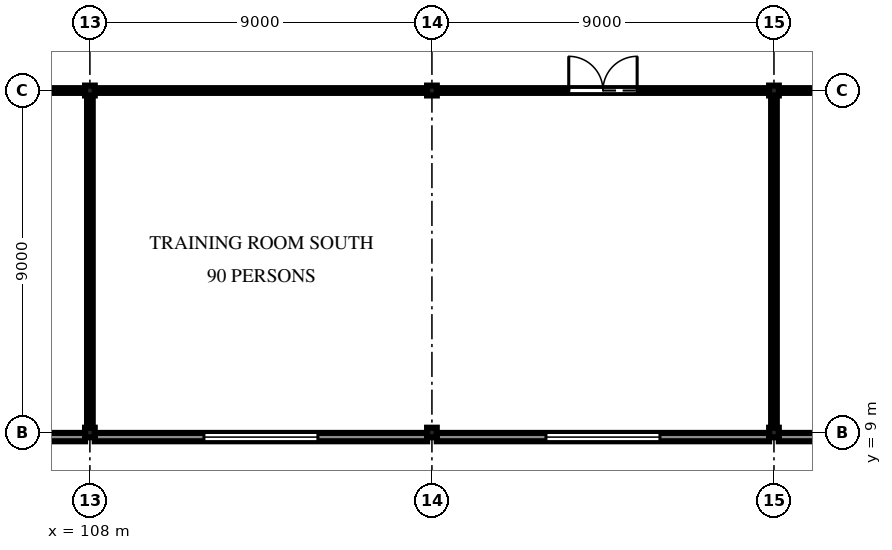
"""IFC4 building model, lengths in metres.
Left out: names, types, materials, properties, quantities, classifications, styles, units other than length and angle.
Written with IfcOpenShell. Run it as: python <this file> out.ifc"""

import sys

from ifc_helpers import new_model, si_unit, direction, frame, frame_2d, origin, origin_2d, place, context, subcontext, project, spatial, polyline, rectangle, i_section, outline, extrude, element, fill, save


model = new_model("IFC4")
c1 = context("Model", 3, precision=1e-05, world=origin(), true_north=direction((0.0, 1.0)))
c2 = subcontext(c1, "Body", "Model", "MODEL_VIEW")
j1 = project(units=[si_unit("LENGTHUNIT", "METRE"), si_unit("PLANEANGLEUNIT", "RADIAN")], contexts=[c1])
p1 = place(None, origin())
s1 = spatial("IfcSite", under=j1, at=p1, CompositionType="ELEMENT")
p2 = place(p1, origin())
s2 = spatial("IfcBuilding", under=s1, at=p2, CompositionType="ELEMENT")
p3 = place(p2, frame((0.0, 0.0, 7.5)))
s3 = spatial("IfcBuildingStorey", under=s2, at=p3, CompositionType="ELEMENT", Elevation=7.5)
p4 = place(p3, frame((108.0, 9.0, 0.0), z_axis=(0.0, 0.0, 1.0), x_axis=(1.0, 0.0, 0.0)))
e1 = element("IfcColumn", 1, at=p4, inside=s3, PredefinedType="COLUMN", context=c2, shape_type="SweptSolid", body=[
    extrude(i_section(OverallWidth=0.255, OverallDepth=0.254, WebThickness=0.009, FlangeThickness=0.014, FilletRadius=0.013, at=origin_2d()), origin(), (0.0, 0.0, 1.0), 4.2),
])
p5 = place(p3, frame((108.0, 18.0, 0.0), z_axis=(0.0, 0.0, 1.0), x_axis=(1.0, 0.0, 0.0)))
e2 = element("IfcColumn", 2, at=p5, inside=s3, PredefinedType="COLUMN", context=c2, shape_type="SweptSolid", body=[
    extrude(i_section(OverallWidth=0.256, OverallDepth=0.26, WebThickness=0.01, FlangeThickness=0.017, FilletRadius=0.013, at=origin_2d()), origin(), (0.0, 0.0, 1.0), 4.2),
])
p6 = place(p3, frame((117.0, 9.0, 0.0), z_axis=(0.0, 0.0, 1.0), x_axis=(1.0, 0.0, 0.0)))
e3 = element("IfcColumn", 3, at=p6, inside=s3, PredefinedType="COLUMN", context=c2, shape_type="SweptSolid", body=[
    extrude(i_section(OverallWidth=0.255, OverallDepth=0.254, WebThickness=0.009, FlangeThickness=0.014, FilletRadius=0.013, at=origin_2d()), origin(), (0.0, 0.0, 1.0), 4.2),
])
p7 = place(p3, frame((117.0, 18.0, 0.0), z_axis=(0.0, 0.0, 1.0), x_axis=(1.0, 0.0, 0.0)))
e4 = element("IfcColumn", 4, at=p7, inside=s3, PredefinedType="COLUMN", context=c2, shape_type="SweptSolid", body=[
    extrude(i_section(OverallWidth=0.256, OverallDepth=0.26, WebThickness=0.01, FlangeThickness=0.017, FilletRadius=0.013, at=origin_2d()), origin(), (0.0, 0.0, 1.0), 4.2),
])
p8 = place(p3, frame((126.0, 9.0, 0.0), z_axis=(0.0, 0.0, 1.0), x_axis=(1.0, 0.0, 0.0)))
e5 = element("IfcColumn", 5, at=p8, inside=s3, PredefinedType="COLUMN", context=c2, shape_type="SweptSolid", body=[
    extrude(i_section(OverallWidth=0.255, OverallDepth=0.254, WebThickness=0.009, FlangeThickness=0.014, FilletRadius=0.013, at=origin_2d()), origin(), (0.0, 0.0, 1.0), 4.2),
])
p9 = place(p3, frame((126.0, 18.0, 0.0), z_axis=(0.0, 0.0, 1.0), x_axis=(1.0, 0.0, 0.0)))
e6 = element("IfcColumn", 6, at=p9, inside=s3, PredefinedType="COLUMN", context=c2, shape_type="SweptSolid", body=[
    extrude(i_section(OverallWidth=0.256, OverallDepth=0.26, WebThickness=0.01, FlangeThickness=0.017, FilletRadius=0.013, at=origin_2d()), origin(), (0.0, 0.0, 1.0), 4.2),
])
p10 = place(p3, frame((99.127, 8.88, -0.13), z_axis=(0.0, 0.0, 1.0), x_axis=(1.0, 0.0, 0.0)))
e7 = element("IfcWall", 7, at=p10, inside=s3, PredefinedType="SOLIDWALL", context=c2, shape_type="SweptSolid", body=[
    extrude(rectangle(XDim=8.746, YDim=0.22, at=frame_2d((4.373, 0.0))), origin(), (0.0, 0.0, 1.0), 3.727),
])
p11 = place(p10, frame((2.873, 0.0, 1.03)))
e8 = element("IfcOpeningElement", 8, at=p11, cuts=e7, PredefinedType="OPENING", context=c2, shape_type="SweptSolid", body=[
    extrude(rectangle(XDim=3.0, YDim=2.1, at=frame_2d((1.5, 1.05))), frame((0.0, 0.12, 0.0), z_axis=(0.0, -1.0, 0.0), x_axis=(1.0, 0.0, 0.0)), (0.0, 0.0, 1.0), 0.24),
])
p12 = place(p3, frame((108.127, 8.88, -0.13), z_axis=(0.0, 0.0, 1.0), x_axis=(1.0, 0.0, 0.0)))
e9 = element("IfcWall", 9, at=p12, inside=s3, PredefinedType="SOLIDWALL", context=c2, shape_type="SweptSolid", body=[
    extrude(rectangle(XDim=8.746, YDim=0.22, at=frame_2d((4.373, 0.0))), origin(), (0.0, 0.0, 1.0), 3.727),
])
p13 = place(p12, frame((2.873, 0.0, 1.03)))
e10 = element("IfcOpeningElement", 10, at=p13, cuts=e9, PredefinedType="OPENING", context=c2, shape_type="SweptSolid", body=[
    extrude(rectangle(XDim=3.0, YDim=2.1, at=frame_2d((1.5, 1.05))), frame((0.0, 0.12, 0.0), z_axis=(0.0, -1.0, 0.0), x_axis=(1.0, 0.0, 0.0)), (0.0, 0.0, 1.0), 0.24),
])
p14 = place(p3, frame((117.127, 8.88, -0.13), z_axis=(0.0, 0.0, 1.0), x_axis=(1.0, 0.0, 0.0)))
e11 = element("IfcWall", 11, at=p14, inside=s3, PredefinedType="SOLIDWALL", context=c2, shape_type="SweptSolid", body=[
    extrude(rectangle(XDim=8.746, YDim=0.22, at=frame_2d((4.373, 0.0))), origin(), (0.0, 0.0, 1.0), 3.727),
])
p15 = place(p14, frame((2.873, 0.0, 1.03)))
e12 = element("IfcOpeningElement", 12, at=p15, cuts=e11, PredefinedType="OPENING", context=c2, shape_type="SweptSolid", body=[
    extrude(rectangle(XDim=3.0, YDim=2.1, at=frame_2d((1.5, 1.05))), frame((0.0, 0.12, 0.0), z_axis=(0.0, -1.0, 0.0), x_axis=(1.0, 0.0, 0.0)), (0.0, 0.0, 1.0), 0.24),
])
p16 = place(p3, frame((126.127, 8.88, -0.13), z_axis=(0.0, 0.0, 1.0), x_axis=(1.0, 0.0, 0.0)))
e13 = element("IfcWall", 13, at=p16, inside=s3, PredefinedType="SOLIDWALL", context=c2, shape_type="SweptSolid", body=[
    extrude(rectangle(XDim=8.746, YDim=0.22, at=frame_2d((4.373, 0.0))), origin(), (0.0, 0.0, 1.0), 3.727),
])
p17 = place(p16, frame((2.873, 0.0, 1.03)))
e14 = element("IfcOpeningElement", 14, at=p17, cuts=e13, PredefinedType="OPENING", context=c2, shape_type="SweptSolid", body=[
    extrude(rectangle(XDim=3.0, YDim=2.1, at=frame_2d((1.5, 1.05))), frame((0.0, 0.12, 0.0), z_axis=(0.0, -1.0, 0.0), x_axis=(1.0, 0.0, 0.0)), (0.0, 0.0, 1.0), 0.24),
])
p18 = place(p3, frame((107.872, 18.0, 0.0), z_axis=(0.0, 0.0, 1.0), x_axis=(-1.0, 0.0, 0.0)))
e15 = element("IfcWall", 15, at=p18, inside=s3, PredefinedType="PARTITIONING", context=c2, shape_type="SweptSolid", body=[
    extrude(rectangle(XDim=8.744, YDim=0.125, at=frame_2d((4.372, 0.0))), origin(), (0.0, 0.0, 1.0), 3.307),
])
p19 = place(p18, frame((3.472, 0.0, 0.0)))
e16 = element("IfcOpeningElement", 16, at=p19, cuts=e15, PredefinedType="OPENING", context=c2, shape_type="SweptSolid", body=[
    extrude(rectangle(XDim=1.8, YDim=2.4, at=frame_2d((0.9, 1.2))), frame((0.0, 0.073, 0.0), z_axis=(0.0, -1.0, 0.0), x_axis=(1.0, 0.0, 0.0)), (0.0, 0.0, 1.0), 0.145),
])
p20 = place(p3, frame((134.872, 18.0, 0.0), z_axis=(0.0, 0.0, 1.0), x_axis=(-1.0, 0.0, 0.0)))
e17 = element("IfcWall", 17, at=p20, inside=s3, PredefinedType="PARTITIONING", context=c2, shape_type="SweptSolid", body=[
    extrude(rectangle(XDim=8.744, YDim=0.125, at=frame_2d((4.372, 0.0))), origin(), (0.0, 0.0, 1.0), 3.307),
])
p21 = place(p20, frame((3.472, 0.0, 0.0)))
e18 = element("IfcOpeningElement", 18, at=p21, cuts=e17, PredefinedType="OPENING", context=c2, shape_type="SweptSolid", body=[
    extrude(rectangle(XDim=1.8, YDim=2.1, at=frame_2d((0.9, 1.05))), frame((0.0, 0.073, 0.0), z_axis=(0.0, -1.0, 0.0), x_axis=(1.0, 0.0, 0.0)), (0.0, 0.0, 1.0), 0.145),
])
p22 = place(p3, frame((125.872, 18.0, 0.0), z_axis=(0.0, 0.0, 1.0), x_axis=(-1.0, 0.0, 0.0)))
e19 = element("IfcWall", 19, at=p22, inside=s3, PredefinedType="PARTITIONING", context=c2, shape_type="SweptSolid", body=[
    extrude(rectangle(XDim=8.744, YDim=0.125, at=frame_2d((4.372, 0.0))), origin(), (0.0, 0.0, 1.0), 3.307),
])
p23 = place(p22, frame((3.472, 0.0, 0.0)))
e20 = element("IfcOpeningElement", 20, at=p23, cuts=e19, PredefinedType="OPENING", context=c2, shape_type="SweptSolid", body=[
    extrude(rectangle(XDim=1.8, YDim=2.4, at=frame_2d((0.9, 1.2))), frame((0.0, 0.073, 0.0), z_axis=(0.0, -1.0, 0.0), x_axis=(1.0, 0.0, 0.0)), (0.0, 0.0, 1.0), 0.145),
])
p24 = place(p3, frame((116.872, 18.0, 0.0), z_axis=(0.0, 0.0, 1.0), x_axis=(-1.0, 0.0, 0.0)))
e21 = element("IfcWall", 21, at=p24, inside=s3, PredefinedType="PARTITIONING", context=c2, shape_type="SweptSolid", body=[
    extrude(rectangle(XDim=8.744, YDim=0.125, at=frame_2d((4.372, 0.0))), origin(), (0.0, 0.0, 1.0), 3.307),
])
for number, where, z_axis, x_axis in (
    (22, (108.0, 17.87, 0.0), (0.0, 0.0, 1.0), (0.0, -1.0, 0.0)),
    (23, (126.0, 17.87, 0.0), (0.0, 0.0, 1.0), (0.0, -1.0, 0.0)),
):
    element("IfcWall", number, at=place(p3, frame(where, z_axis=z_axis, x_axis=x_axis)), inside=s3, PredefinedType="PARTITIONING", context=c2, shape_type="SweptSolid", body=[
        extrude(rectangle(XDim=8.743, YDim=0.15, at=frame_2d((4.372, 0.0))), origin(), (0.0, 0.0, 1.0), 3.307),
    ])
p25 = place(p13, origin())
e24 = element("IfcWindow", 24, at=p25, inside=s3, PartitioningType="TRIPLE_PANEL_VERTICAL", PredefinedType="WINDOW", context=c2, shape_type="SweptSolid", body=[
    extrude(outline(polyline([(0.0, 0.0), (3.0, 0.0), (3.0, 2.1), (0.0, 2.1), (0.0, 0.0)]), holes=[polyline([(0.07, 0.07), (2.93, 0.07), (2.93, 2.03), (0.07, 2.03), (0.07, 0.07)])]), frame((0.0, 0.03, 0.0), z_axis=(0.0, -1.0, 0.0), x_axis=(1.0, 0.0, 0.0)), (0.0, 0.0, 1.0), 0.06),
    extrude(rectangle(XDim=0.04, YDim=1.96, at=frame_2d((1.017, 1.05))), frame((0.0, 0.022, 0.0), z_axis=(0.0, -1.0, 0.0), x_axis=(1.0, 0.0, 0.0)), (0.0, 0.0, 1.0), 0.044),
    extrude(rectangle(XDim=0.04, YDim=1.96, at=frame_2d((1.983, 1.05))), frame((0.0, 0.022, 0.0), z_axis=(0.0, -1.0, 0.0), x_axis=(1.0, 0.0, 0.0)), (0.0, 0.0, 1.0), 0.044),
    extrude(outline(polyline([(0.07, 0.07), (0.997, 0.07), (0.997, 2.03), (0.07, 2.03), (0.07, 0.07)]), holes=[polyline([(0.1, 0.1), (0.967, 0.1), (0.967, 2.0), (0.1, 2.0), (0.1, 0.1)])]), frame((0.0, 0.022, 0.0), z_axis=(0.0, -1.0, 0.0), x_axis=(1.0, 0.0, 0.0)), (0.0, 0.0, 1.0), 0.045),
    extrude(rectangle(XDim=0.866, YDim=1.9, at=frame_2d((0.533, 1.05))), frame((0.0, 0.006, 0.0), z_axis=(0.0, -1.0, 0.0), x_axis=(1.0, 0.0, 0.0)), (0.0, 0.0, 1.0), 0.012),
    extrude(outline(polyline([(1.037, 0.07), (1.963, 0.07), (1.963, 2.03), (1.037, 2.03), (1.037, 0.07)]), holes=[polyline([(1.067, 0.1), (1.933, 0.1), (1.933, 2.0), (1.067, 2.0), (1.067, 0.1)])]), frame((0.0, 0.022, 0.0), z_axis=(0.0, -1.0, 0.0), x_axis=(1.0, 0.0, 0.0)), (0.0, 0.0, 1.0), 0.045),
    extrude(rectangle(XDim=0.867, YDim=1.9, at=frame_2d((1.5, 1.05))), frame((0.0, 0.006, 0.0), z_axis=(0.0, -1.0, 0.0), x_axis=(1.0, 0.0, 0.0)), (0.0, 0.0, 1.0), 0.012),
    extrude(outline(polyline([(2.003, 0.07), (2.93, 0.07), (2.93, 2.03), (2.003, 2.03), (2.003, 0.07)]), holes=[polyline([(2.033, 0.1), (2.9, 0.1), (2.9, 2.0), (2.033, 2.0), (2.033, 0.1)])]), frame((0.0, 0.022, 0.0), z_axis=(0.0, -1.0, 0.0), x_axis=(1.0, 0.0, 0.0)), (0.0, 0.0, 1.0), 0.045),
    extrude(rectangle(XDim=0.866, YDim=1.9, at=frame_2d((2.467, 1.05))), frame((0.0, 0.006, 0.0), z_axis=(0.0, -1.0, 0.0), x_axis=(1.0, 0.0, 0.0)), (0.0, 0.0, 1.0), 0.012),
])
fill(e10, e24)
p26 = place(p15, origin())
e25 = element("IfcWindow", 25, at=p26, inside=s3, PartitioningType="TRIPLE_PANEL_VERTICAL", PredefinedType="WINDOW", context=c2, shape_type="SweptSolid", body=[
    extrude(outline(polyline([(0.0, 0.0), (3.0, 0.0), (3.0, 2.1), (0.0, 2.1), (0.0, 0.0)]), holes=[polyline([(0.07, 0.07), (2.93, 0.07), (2.93, 2.03), (0.07, 2.03), (0.07, 0.07)])]), frame((0.0, 0.03, 0.0), z_axis=(0.0, -1.0, 0.0), x_axis=(1.0, 0.0, 0.0)), (0.0, 0.0, 1.0), 0.06),
    extrude(rectangle(XDim=0.04, YDim=1.96, at=frame_2d((1.017, 1.05))), frame((0.0, 0.022, 0.0), z_axis=(0.0, -1.0, 0.0), x_axis=(1.0, 0.0, 0.0)), (0.0, 0.0, 1.0), 0.044),
    extrude(rectangle(XDim=0.04, YDim=1.96, at=frame_2d((1.983, 1.05))), frame((0.0, 0.022, 0.0), z_axis=(0.0, -1.0, 0.0), x_axis=(1.0, 0.0, 0.0)), (0.0, 0.0, 1.0), 0.044),
    extrude(outline(polyline([(0.07, 0.07), (0.997, 0.07), (0.997, 2.03), (0.07, 2.03), (0.07, 0.07)]), holes=[polyline([(0.1, 0.1), (0.967, 0.1), (0.967, 2.0), (0.1, 2.0), (0.1, 0.1)])]), frame((0.0, 0.022, 0.0), z_axis=(0.0, -1.0, 0.0), x_axis=(1.0, 0.0, 0.0)), (0.0, 0.0, 1.0), 0.045),
    extrude(rectangle(XDim=0.866, YDim=1.9, at=frame_2d((0.533, 1.05))), frame((0.0, 0.006, 0.0), z_axis=(0.0, -1.0, 0.0), x_axis=(1.0, 0.0, 0.0)), (0.0, 0.0, 1.0), 0.012),
    extrude(outline(polyline([(1.037, 0.07), (1.963, 0.07), (1.963, 2.03), (1.037, 2.03), (1.037, 0.07)]), holes=[polyline([(1.067, 0.1), (1.933, 0.1), (1.933, 2.0), (1.067, 2.0), (1.067, 0.1)])]), frame((0.0, 0.022, 0.0), z_axis=(0.0, -1.0, 0.0), x_axis=(1.0, 0.0, 0.0)), (0.0, 0.0, 1.0), 0.045),
    extrude(rectangle(XDim=0.867, YDim=1.9, at=frame_2d((1.5, 1.05))), frame((0.0, 0.006, 0.0), z_axis=(0.0, -1.0, 0.0), x_axis=(1.0, 0.0, 0.0)), (0.0, 0.0, 1.0), 0.012),
    extrude(outline(polyline([(2.003, 0.07), (2.93, 0.07), (2.93, 2.03), (2.003, 2.03), (2.003, 0.07)]), holes=[polyline([(2.033, 0.1), (2.9, 0.1), (2.9, 2.0), (2.033, 2.0), (2.033, 0.1)])]), frame((0.0, 0.022, 0.0), z_axis=(0.0, -1.0, 0.0), x_axis=(1.0, 0.0, 0.0)), (0.0, 0.0, 1.0), 0.045),
    extrude(rectangle(XDim=0.866, YDim=1.9, at=frame_2d((2.467, 1.05))), frame((0.0, 0.006, 0.0), z_axis=(0.0, -1.0, 0.0), x_axis=(1.0, 0.0, 0.0)), (0.0, 0.0, 1.0), 0.012),
])
fill(e12, e25)
p27 = place(p23, frame((1.8, 0.0, 0.0), z_axis=(0.0, 0.0, 1.0), x_axis=(-1.0, 0.0, 0.0)))
e26 = element("IfcDoor", 26, at=p27, inside=s3, OperationType="DOUBLE_DOOR_SINGLE_SWING", PredefinedType="DOOR", context=c2, shape_type="SweptSolid", body=[
    extrude(outline(polyline([(0.0, 0.0), (0.07, 0.0), (0.07, 2.33), (1.73, 2.33), (1.73, 0.0), (1.8, 0.0), (1.8, 2.4), (0.0, 2.4), (0.0, 0.0)])), frame((0.0, 0.025, 0.0), z_axis=(0.0, -1.0, 0.0), x_axis=(1.0, 0.0, 0.0)), (0.0, 0.0, 1.0), 0.05),
    extrude(outline(polyline([(0.074, 0.01), (0.897, 0.01), (0.897, 2.326), (0.074, 2.326), (0.074, 0.01)]), holes=[polyline([(0.194, 0.16), (0.777, 0.16), (0.777, 1.01), (0.194, 1.01), (0.194, 0.16)]), polyline([(0.335, 1.16), (0.635, 1.16), (0.635, 1.76), (0.335, 1.76), (0.335, 1.16)])]), frame((0.0, 0.017, 0.0), z_axis=(0.0, -1.0, 0.0), x_axis=(1.0, 0.0, 0.0)), (0.0, 0.0, 1.0), 0.035),
    extrude(rectangle(XDim=0.583, YDim=0.85, at=frame_2d((0.485, 0.585))), frame((0.0, 0.009, 0.0), z_axis=(0.0, -1.0, 0.0), x_axis=(1.0, 0.0, 0.0)), (0.0, 0.0, 1.0), 0.017),
    extrude(rectangle(XDim=0.3, YDim=0.6, at=frame_2d((0.485, 1.46))), frame((0.0, 0.006, 0.0), z_axis=(0.0, -1.0, 0.0), x_axis=(1.0, 0.0, 0.0)), (0.0, 0.0, 1.0), 0.012),
    extrude(outline(polyline([(0.903, 0.01), (1.726, 0.01), (1.726, 2.326), (0.903, 2.326), (0.903, 0.01)]), holes=[polyline([(1.023, 0.16), (1.606, 0.16), (1.606, 1.01), (1.023, 1.01), (1.023, 0.16)]), polyline([(1.165, 1.16), (1.465, 1.16), (1.465, 1.76), (1.165, 1.76), (1.165, 1.16)])]), frame((0.0, 0.017, 0.0), z_axis=(0.0, -1.0, 0.0), x_axis=(1.0, 0.0, 0.0)), (0.0, 0.0, 1.0), 0.035),
    extrude(rectangle(XDim=0.583, YDim=0.85, at=frame_2d((1.314, 0.585))), frame((0.0, 0.009, 0.0), z_axis=(0.0, -1.0, 0.0), x_axis=(1.0, 0.0, 0.0)), (0.0, 0.0, 1.0), 0.017),
    extrude(rectangle(XDim=0.3, YDim=0.6, at=frame_2d((1.314, 1.46))), frame((0.0, 0.006, 0.0), z_axis=(0.0, -1.0, 0.0), x_axis=(1.0, 0.0, 0.0)), (0.0, 0.0, 1.0), 0.012),
])
fill(e20, e26)
save(model, sys.argv[1])
